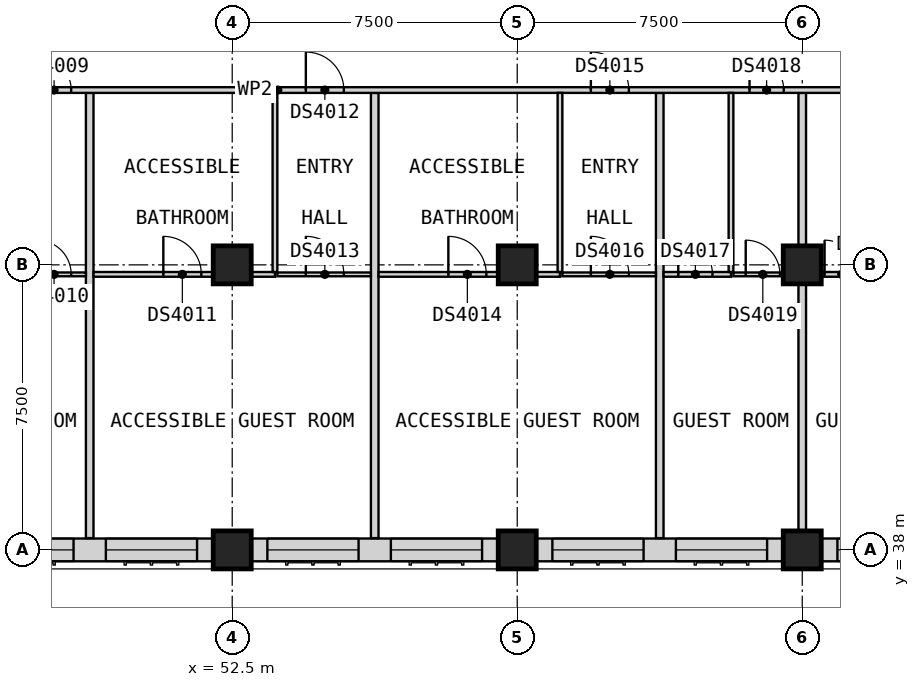
"""IFC4 building model, lengths in metres.
Left out: names, types, materials, properties, quantities, classifications, styles, units other than length and angle.
Written with IfcOpenShell. Run it as: python <this file> out.ifc"""

import sys

from ifc_helpers import new_model, si_unit, direction, frame, frame_2d, origin, origin_2d, place, context, subcontext, project, spatial, rectangle, extrude, element, fill, save


model = new_model("IFC4")
c1 = context("Model", 3, precision=1e-05, world=origin(), true_north=direction((0.0, 1.0)))
c2 = subcontext(c1, "Body", "Model", "MODEL_VIEW")
j1 = project(units=[si_unit("LENGTHUNIT", "METRE"), si_unit("PLANEANGLEUNIT", "RADIAN")], contexts=[c1])
p1 = place(None, origin())
s1 = spatial("IfcSite", under=j1, at=p1, CompositionType="ELEMENT")
p2 = place(p1, origin())
s2 = spatial("IfcBuilding", under=s1, at=p2, CompositionType="ELEMENT")
p3 = place(p2, frame((0.0, 0.0, 141.0)))
s3 = spatial("IfcBuildingStorey", under=s2, at=p3, CompositionType="ELEMENT", Elevation=141.0)
for number, where, z_axis, x_axis in (
    (1, (52.5, 38.0, 0.0), (0.0, 0.0, 1.0), (1.0, 0.0, 0.0)),
    (2, (52.5, 45.5, 0.0), (0.0, 0.0, 1.0), (1.0, 0.0, 0.0)),
    (3, (60.0, 38.0, 0.0), (0.0, 0.0, 1.0), (1.0, 0.0, 0.0)),
    (4, (60.0, 45.5, 0.0), (0.0, 0.0, 1.0), (1.0, 0.0, 0.0)),
    (5, (67.5, 38.0, 0.0), (0.0, 0.0, 1.0), (1.0, 0.0, 0.0)),
    (6, (67.5, 45.5, 0.0), (0.0, 0.0, 1.0), (1.0, 0.0, 0.0)),
):
    element("IfcColumn", number, at=place(p3, frame(where, z_axis=z_axis, x_axis=x_axis)), inside=s3, PredefinedType="COLUMN", context=c2, shape_type="SweptSolid", body=[
        extrude(rectangle(XDim=1.0, YDim=1.0, at=origin_2d()), origin(), (0.0, 0.0, 1.0), 3.6),
    ])
p4 = place(p3, frame((45.5, 38.0, 0.0), z_axis=(0.0, 0.0, 1.0), x_axis=(1.0, 0.0, 0.0)))
e7 = element("IfcWall", 7, at=p4, inside=s3, PredefinedType="SOLIDWALL", context=c2, shape_type="SweptSolid", body=[
    extrude(rectangle(XDim=6.5, YDim=0.6, at=frame_2d((3.25, 0.0))), origin(), (0.0, 0.0, 1.0), 2.85),
])
p5 = place(p4, frame((0.425, 0.0, 0.8)))
e8 = element("IfcOpeningElement", 8, at=p5, cuts=e7, PredefinedType="OPENING", context=c2, shape_type="SweptSolid", body=[
    extrude(rectangle(XDim=2.4, YDim=1.8, at=frame_2d((1.2, 0.9))), frame((0.0, 0.31, 0.0), z_axis=(0.0, -1.0, 0.0), x_axis=(1.0, 0.0, 0.0)), (0.0, 0.0, 1.0), 0.62),
])
p6 = place(p4, frame((3.675, 0.0, 0.8)))
e9 = element("IfcOpeningElement", 9, at=p6, cuts=e7, PredefinedType="OPENING", context=c2, shape_type="SweptSolid", body=[
    extrude(rectangle(XDim=2.4, YDim=1.8, at=frame_2d((1.2, 0.9))), frame((0.0, 0.31, 0.0), z_axis=(0.0, -1.0, 0.0), x_axis=(1.0, 0.0, 0.0)), (0.0, 0.0, 1.0), 0.62),
])
p7 = place(p3, frame((53.0, 38.0, 0.0), z_axis=(0.0, 0.0, 1.0), x_axis=(1.0, 0.0, 0.0)))
e10 = element("IfcWall", 10, at=p7, inside=s3, PredefinedType="SOLIDWALL", context=c2, shape_type="SweptSolid", body=[
    extrude(rectangle(XDim=6.5, YDim=0.6, at=frame_2d((3.25, 0.0))), origin(), (0.0, 0.0, 1.0), 2.85),
])
p8 = place(p7, frame((0.425, 0.0, 0.8)))
e11 = element("IfcOpeningElement", 11, at=p8, cuts=e10, PredefinedType="OPENING", context=c2, shape_type="SweptSolid", body=[
    extrude(rectangle(XDim=2.4, YDim=1.8, at=frame_2d((1.2, 0.9))), frame((0.0, 0.31, 0.0), z_axis=(0.0, -1.0, 0.0), x_axis=(1.0, 0.0, 0.0)), (0.0, 0.0, 1.0), 0.62),
])
p9 = place(p7, frame((3.675, 0.0, 0.8)))
e12 = element("IfcOpeningElement", 12, at=p9, cuts=e10, PredefinedType="OPENING", context=c2, shape_type="SweptSolid", body=[
    extrude(rectangle(XDim=2.4, YDim=1.8, at=frame_2d((1.2, 0.9))), frame((0.0, 0.31, 0.0), z_axis=(0.0, -1.0, 0.0), x_axis=(1.0, 0.0, 0.0)), (0.0, 0.0, 1.0), 0.62),
])
p10 = place(p3, frame((60.5, 38.0, 0.0), z_axis=(0.0, 0.0, 1.0), x_axis=(1.0, 0.0, 0.0)))
e13 = element("IfcWall", 13, at=p10, inside=s3, PredefinedType="SOLIDWALL", context=c2, shape_type="SweptSolid", body=[
    extrude(rectangle(XDim=6.5, YDim=0.6, at=frame_2d((3.25, 0.0))), origin(), (0.0, 0.0, 1.0), 2.85),
])
p11 = place(p10, frame((0.425, 0.0, 0.8)))
e14 = element("IfcOpeningElement", 14, at=p11, cuts=e13, PredefinedType="OPENING", context=c2, shape_type="SweptSolid", body=[
    extrude(rectangle(XDim=2.4, YDim=1.8, at=frame_2d((1.2, 0.9))), frame((0.0, 0.31, 0.0), z_axis=(0.0, -1.0, 0.0), x_axis=(1.0, 0.0, 0.0)), (0.0, 0.0, 1.0), 0.62),
])
p12 = place(p10, frame((3.675, 0.0, 0.8)))
e15 = element("IfcOpeningElement", 15, at=p12, cuts=e13, PredefinedType="OPENING", context=c2, shape_type="SweptSolid", body=[
    extrude(rectangle(XDim=2.4, YDim=1.8, at=frame_2d((1.2, 0.9))), frame((0.0, 0.31, 0.0), z_axis=(0.0, -1.0, 0.0), x_axis=(1.0, 0.0, 0.0)), (0.0, 0.0, 1.0), 0.62),
])
p13 = place(p3, frame((68.0, 38.0, 0.0), z_axis=(0.0, 0.0, 1.0), x_axis=(1.0, 0.0, 0.0)))
e16 = element("IfcWall", 16, at=p13, inside=s3, PredefinedType="SOLIDWALL", context=c2, shape_type="SweptSolid", body=[
    extrude(rectangle(XDim=6.0, YDim=0.6, at=frame_2d((3.0, 0.0))), origin(), (0.0, 0.0, 1.0), 2.85),
])
p14 = place(p13, frame((0.425, 0.0, 0.8)))
e17 = element("IfcOpeningElement", 17, at=p14, cuts=e16, PredefinedType="OPENING", context=c2, shape_type="SweptSolid", body=[
    extrude(rectangle(XDim=2.4, YDim=1.8, at=frame_2d((1.2, 0.9))), frame((0.0, 0.31, 0.0), z_axis=(0.0, -1.0, 0.0), x_axis=(1.0, 0.0, 0.0)), (0.0, 0.0, 1.0), 0.62),
])
p15 = place(p13, frame((3.425, 0.0, 0.8)))
e18 = element("IfcOpeningElement", 18, at=p15, cuts=e16, PredefinedType="OPENING", context=c2, shape_type="SweptSolid", body=[
    extrude(rectangle(XDim=2.4, YDim=1.8, at=frame_2d((1.2, 0.9))), frame((0.0, 0.31, 0.0), z_axis=(0.0, -1.0, 0.0), x_axis=(1.0, 0.0, 0.0)), (0.0, 0.0, 1.0), 0.62),
])
for number, where, z_axis, x_axis in (
    (19, (48.75, 38.31, 0.0), (0.0, 0.0, 1.0), (0.0, 1.0, 0.0)),
    (20, (56.25, 38.31, 0.0), (0.0, 0.0, 1.0), (0.0, 1.0, 0.0)),
    (21, (63.75, 38.31, 0.0), (0.0, 0.0, 1.0), (0.0, 1.0, 0.0)),
):
    element("IfcWall", number, at=place(p3, frame(where, z_axis=z_axis, x_axis=x_axis)), inside=s3, PredefinedType="PARTITIONING", context=c2, shape_type="SweptSolid", body=[
        extrude(rectangle(XDim=11.715, YDim=0.2, at=frame_2d((5.857, 0.0))), origin(), (0.0, 0.0, 1.0), 3.35),
    ])
p16 = place(p3, frame((67.5, 37.5, 0.0), z_axis=(0.0, 0.0, 1.0), x_axis=(0.0, 1.0, 0.0)))
e22 = element("IfcWall", 22, at=p16, inside=s3, PredefinedType="PARTITIONING", context=c2, shape_type="SweptSolid", body=[
    extrude(rectangle(XDim=12.525, YDim=0.2, at=frame_2d((6.262, 0.0))), origin(), (0.0, 0.0, 1.0), 3.35),
])
p17 = place(p3, frame((33.75, 50.1, 0.0), z_axis=(0.0, 0.0, 1.0), x_axis=(1.0, 0.0, 0.0)))
e23 = element("IfcWall", 23, at=p17, inside=s3, PredefinedType="PARTITIONING", context=c2, shape_type="SweptSolid", body=[
    extrude(rectangle(XDim=39.9, YDim=0.15, at=frame_2d((19.95, 0.0))), origin(), (0.0, 0.0, 1.0), 3.35),
])
p18 = place(p17, frame((5.175, 0.0, 0.0)))
e24 = element("IfcOpeningElement", 24, at=p18, cuts=e23, PredefinedType="OPENING", context=c2, shape_type="SweptSolid", body=[
    extrude(rectangle(XDim=0.9, YDim=2.1, at=frame_2d((0.45, 1.05))), frame((0.0, 0.085, 0.0), z_axis=(0.0, -1.0, 0.0), x_axis=(1.0, 0.0, 0.0)), (0.0, 0.0, 1.0), 0.17),
])
p19 = place(p17, frame((9.863, 0.0, 0.0)))
e25 = element("IfcOpeningElement", 25, at=p19, cuts=e23, PredefinedType="OPENING", context=c2, shape_type="SweptSolid", body=[
    extrude(rectangle(XDim=0.9, YDim=2.1, at=frame_2d((0.45, 1.05))), frame((0.0, 0.085, 0.0), z_axis=(0.0, -1.0, 0.0), x_axis=(1.0, 0.0, 0.0)), (0.0, 0.0, 1.0), 0.17),
])
p20 = place(p17, frame((13.613, 0.0, 0.0)))
e26 = element("IfcOpeningElement", 26, at=p20, cuts=e23, PredefinedType="OPENING", context=c2, shape_type="SweptSolid", body=[
    extrude(rectangle(XDim=0.9, YDim=2.1, at=frame_2d((0.45, 1.05))), frame((0.0, 0.085, 0.0), z_axis=(0.0, -1.0, 0.0), x_axis=(1.0, 0.0, 0.0)), (0.0, 0.0, 1.0), 0.17),
])
p21 = place(p17, frame((20.688, 0.0, 0.0)))
e27 = element("IfcOpeningElement", 27, at=p21, cuts=e23, PredefinedType="OPENING", context=c2, shape_type="SweptSolid", body=[
    extrude(rectangle(XDim=1.0, YDim=2.1, at=frame_2d((0.5, 1.05))), frame((0.0, 0.085, 0.0), z_axis=(0.0, -1.0, 0.0), x_axis=(1.0, 0.0, 0.0)), (0.0, 0.0, 1.0), 0.17),
])
p22 = place(p17, frame((28.188, 0.0, 0.0)))
e28 = element("IfcOpeningElement", 28, at=p22, cuts=e23, PredefinedType="OPENING", context=c2, shape_type="SweptSolid", body=[
    extrude(rectangle(XDim=1.0, YDim=2.1, at=frame_2d((0.5, 1.05))), frame((0.0, 0.085, 0.0), z_axis=(0.0, -1.0, 0.0), x_axis=(1.0, 0.0, 0.0)), (0.0, 0.0, 1.0), 0.17),
])
p23 = place(p17, frame((32.363, 0.0, 0.0)))
e29 = element("IfcOpeningElement", 29, at=p23, cuts=e23, PredefinedType="OPENING", context=c2, shape_type="SweptSolid", body=[
    extrude(rectangle(XDim=0.9, YDim=2.1, at=frame_2d((0.45, 1.05))), frame((0.0, 0.085, 0.0), z_axis=(0.0, -1.0, 0.0), x_axis=(1.0, 0.0, 0.0)), (0.0, 0.0, 1.0), 0.17),
])
p24 = place(p17, frame((36.113, 0.0, 0.0)))
e30 = element("IfcOpeningElement", 30, at=p24, cuts=e23, PredefinedType="OPENING", context=c2, shape_type="SweptSolid", body=[
    extrude(rectangle(XDim=0.9, YDim=2.1, at=frame_2d((0.45, 1.05))), frame((0.0, 0.085, 0.0), z_axis=(0.0, -1.0, 0.0), x_axis=(1.0, 0.0, 0.0)), (0.0, 0.0, 1.0), 0.17),
])
p25 = place(p17, frame((38.25, 0.0, 0.0)))
e31 = element("IfcOpeningElement", 31, at=p25, cuts=e23, PredefinedType="OPENING", context=c2, shape_type="SweptSolid", body=[
    extrude(rectangle(XDim=0.9, YDim=2.1, at=frame_2d((0.45, 1.05))), frame((0.0, 0.085, 0.0), z_axis=(0.0, -1.0, 0.0), x_axis=(1.0, 0.0, 0.0)), (0.0, 0.0, 1.0), 0.17),
])
p26 = place(p3, frame((46.938, 45.25, 0.0), z_axis=(0.0, 0.0, 1.0), x_axis=(1.0, 0.0, 0.0)))
e32 = element("IfcWall", 32, at=p26, inside=s3, PredefinedType="PARTITIONING", context=c2, shape_type="SweptSolid", body=[
    extrude(rectangle(XDim=1.712, YDim=0.1, at=frame_2d((0.856, 0.0))), origin(), (0.0, 0.0, 1.0), 3.35),
])
p27 = place(p26, frame((0.425, 0.0, 0.0)))
e33 = element("IfcOpeningElement", 33, at=p27, cuts=e32, PredefinedType="OPENING", context=c2, shape_type="SweptSolid", body=[
    extrude(rectangle(XDim=0.9, YDim=2.1, at=frame_2d((0.45, 1.05))), frame((0.0, 0.06, 0.0), z_axis=(0.0, -1.0, 0.0), x_axis=(1.0, 0.0, 0.0)), (0.0, 0.0, 1.0), 0.12),
])
p28 = place(p3, frame((53.688, 45.25, 0.0), z_axis=(0.0, 0.0, 1.0), x_axis=(1.0, 0.0, 0.0)))
e34 = element("IfcWall", 34, at=p28, inside=s3, PredefinedType="PARTITIONING", context=c2, shape_type="SweptSolid", body=[
    extrude(rectangle(XDim=2.462, YDim=0.1, at=frame_2d((1.231, 0.0))), origin(), (0.0, 0.0, 1.0), 3.35),
])
p29 = place(p28, frame((0.75, 0.0, 0.0)))
e35 = element("IfcOpeningElement", 35, at=p29, cuts=e34, PredefinedType="OPENING", context=c2, shape_type="SweptSolid", body=[
    extrude(rectangle(XDim=1.0, YDim=2.1, at=frame_2d((0.5, 1.05))), frame((0.0, 0.06, 0.0), z_axis=(0.0, -1.0, 0.0), x_axis=(1.0, 0.0, 0.0)), (0.0, 0.0, 1.0), 0.12),
])
p30 = place(p3, frame((61.188, 45.25, 0.0), z_axis=(0.0, 0.0, 1.0), x_axis=(1.0, 0.0, 0.0)))
e36 = element("IfcWall", 36, at=p30, inside=s3, PredefinedType="PARTITIONING", context=c2, shape_type="SweptSolid", body=[
    extrude(rectangle(XDim=2.462, YDim=0.1, at=frame_2d((1.231, 0.0))), origin(), (0.0, 0.0, 1.0), 3.35),
])
p31 = place(p30, frame((0.75, 0.0, 0.0)))
e37 = element("IfcOpeningElement", 37, at=p31, cuts=e36, PredefinedType="OPENING", context=c2, shape_type="SweptSolid", body=[
    extrude(rectangle(XDim=1.0, YDim=2.1, at=frame_2d((0.5, 1.05))), frame((0.0, 0.06, 0.0), z_axis=(0.0, -1.0, 0.0), x_axis=(1.0, 0.0, 0.0)), (0.0, 0.0, 1.0), 0.12),
])
p32 = place(p3, frame((65.688, 45.25, 0.0), z_axis=(0.0, 0.0, 1.0), x_axis=(1.0, 0.0, 0.0)))
e38 = element("IfcWall", 38, at=p32, inside=s3, PredefinedType="PARTITIONING", context=c2, shape_type="SweptSolid", body=[
    extrude(rectangle(XDim=1.712, YDim=0.1, at=frame_2d((0.856, 0.0))), origin(), (0.0, 0.0, 1.0), 3.35),
])
p33 = place(p32, frame((0.325, 0.0, 0.0)))
e39 = element("IfcOpeningElement", 39, at=p33, cuts=e38, PredefinedType="OPENING", context=c2, shape_type="SweptSolid", body=[
    extrude(rectangle(XDim=0.9, YDim=2.1, at=frame_2d((0.45, 1.05))), frame((0.0, 0.06, 0.0), z_axis=(0.0, -1.0, 0.0), x_axis=(1.0, 0.0, 0.0)), (0.0, 0.0, 1.0), 0.12),
])
p34 = place(p3, frame((48.85, 45.25, 0.0), z_axis=(0.0, 0.0, 1.0), x_axis=(1.0, 0.0, 0.0)))
e40 = element("IfcWall", 40, at=p34, inside=s3, PredefinedType="PARTITIONING", context=c2, shape_type="SweptSolid", body=[
    extrude(rectangle(XDim=4.775, YDim=0.125, at=frame_2d((2.387, 0.0))), origin(), (0.0, 0.0, 1.0), 3.35),
])
p35 = place(p34, frame((1.837, 0.0, 0.0)))
e41 = element("IfcOpeningElement", 41, at=p35, cuts=e40, PredefinedType="OPENING", context=c2, shape_type="SweptSolid", body=[
    extrude(rectangle(XDim=1.0, YDim=2.1, at=frame_2d((0.5, 1.05))), frame((0.0, 0.073, 0.0), z_axis=(0.0, -1.0, 0.0), x_axis=(1.0, 0.0, 0.0)), (0.0, 0.0, 1.0), 0.145),
])
p36 = place(p3, frame((56.35, 45.25, 0.0), z_axis=(0.0, 0.0, 1.0), x_axis=(1.0, 0.0, 0.0)))
e42 = element("IfcWall", 42, at=p36, inside=s3, PredefinedType="PARTITIONING", context=c2, shape_type="SweptSolid", body=[
    extrude(rectangle(XDim=4.775, YDim=0.125, at=frame_2d((2.387, 0.0))), origin(), (0.0, 0.0, 1.0), 3.35),
])
p37 = place(p36, frame((1.837, 0.0, 0.0)))
e43 = element("IfcOpeningElement", 43, at=p37, cuts=e42, PredefinedType="OPENING", context=c2, shape_type="SweptSolid", body=[
    extrude(rectangle(XDim=1.0, YDim=2.1, at=frame_2d((0.5, 1.05))), frame((0.0, 0.073, 0.0), z_axis=(0.0, -1.0, 0.0), x_axis=(1.0, 0.0, 0.0)), (0.0, 0.0, 1.0), 0.145),
])
p38 = place(p3, frame((63.85, 45.25, 0.0), z_axis=(0.0, 0.0, 1.0), x_axis=(1.0, 0.0, 0.0)))
e44 = element("IfcWall", 44, at=p38, inside=s3, PredefinedType="PARTITIONING", context=c2, shape_type="SweptSolid", body=[
    extrude(rectangle(XDim=1.775, YDim=0.125, at=frame_2d((0.887, 0.0))), origin(), (0.0, 0.0, 1.0), 3.35),
])
p39 = place(p38, frame((0.387, 0.0, 0.0)))
e45 = element("IfcOpeningElement", 45, at=p39, cuts=e44, PredefinedType="OPENING", context=c2, shape_type="SweptSolid", body=[
    extrude(rectangle(XDim=0.9, YDim=2.1, at=frame_2d((0.45, 1.05))), frame((0.0, 0.073, 0.0), z_axis=(0.0, -1.0, 0.0), x_axis=(1.0, 0.0, 0.0)), (0.0, 0.0, 1.0), 0.145),
])
p40 = place(p3, frame((67.6, 45.25, 0.0), z_axis=(0.0, 0.0, 1.0), x_axis=(1.0, 0.0, 0.0)))
e46 = element("IfcWall", 46, at=p40, inside=s3, PredefinedType="PARTITIONING", context=c2, shape_type="SweptSolid", body=[
    extrude(rectangle(XDim=1.775, YDim=0.125, at=frame_2d((0.887, 0.0))), origin(), (0.0, 0.0, 1.0), 3.35),
])
p41 = place(p40, frame((0.488, 0.0, 0.0)))
e47 = element("IfcOpeningElement", 47, at=p41, cuts=e46, PredefinedType="OPENING", context=c2, shape_type="SweptSolid", body=[
    extrude(rectangle(XDim=0.9, YDim=2.1, at=frame_2d((0.45, 1.05))), frame((0.0, 0.073, 0.0), z_axis=(0.0, -1.0, 0.0), x_axis=(1.0, 0.0, 0.0)), (0.0, 0.0, 1.0), 0.145),
])
for number, where, z_axis, x_axis in (
    (48, (53.625, 45.312, 0.0), (0.0, 0.0, 1.0), (0.0, 1.0, 0.0)),
    (49, (61.125, 45.312, 0.0), (0.0, 0.0, 1.0), (0.0, 1.0, 0.0)),
    (50, (65.625, 45.312, 0.0), (0.0, 0.0, 1.0), (0.0, 1.0, 0.0)),
):
    element("IfcWall", number, at=place(p3, frame(where, z_axis=z_axis, x_axis=x_axis)), inside=s3, PredefinedType="PARTITIONING", context=c2, shape_type="SweptSolid", body=[
        extrude(rectangle(XDim=4.712, YDim=0.125, at=frame_2d((2.356, 0.0))), origin(), (0.0, 0.0, 1.0), 3.35),
    ])
p42 = place(p5, origin())
e51 = element("IfcWindow", 51, at=p42, inside=s3, PartitioningType="SINGLE_PANEL", PredefinedType="WINDOW", context=c2, shape_type="SweptSolid", body=[
    extrude(rectangle(XDim=2.4, YDim=1.8, at=frame_2d((1.2, 0.9))), frame((0.0, -0.07, 0.0), z_axis=(0.0, -1.0, 0.0), x_axis=(1.0, 0.0, 0.0)), (0.0, 0.0, 1.0), 0.06),
])
fill(e8, e51)
p43 = place(p6, origin())
e52 = element("IfcWindow", 52, at=p43, inside=s3, PartitioningType="SINGLE_PANEL", PredefinedType="WINDOW", context=c2, shape_type="SweptSolid", body=[
    extrude(rectangle(XDim=2.4, YDim=1.8, at=frame_2d((1.2, 0.9))), frame((0.0, -0.07, 0.0), z_axis=(0.0, -1.0, 0.0), x_axis=(1.0, 0.0, 0.0)), (0.0, 0.0, 1.0), 0.06),
])
fill(e9, e52)
p44 = place(p8, origin())
e53 = element("IfcWindow", 53, at=p44, inside=s3, PartitioningType="SINGLE_PANEL", PredefinedType="WINDOW", context=c2, shape_type="SweptSolid", body=[
    extrude(rectangle(XDim=2.4, YDim=1.8, at=frame_2d((1.2, 0.9))), frame((0.0, -0.07, 0.0), z_axis=(0.0, -1.0, 0.0), x_axis=(1.0, 0.0, 0.0)), (0.0, 0.0, 1.0), 0.06),
])
fill(e11, e53)
p45 = place(p9, origin())
e54 = element("IfcWindow", 54, at=p45, inside=s3, PartitioningType="SINGLE_PANEL", PredefinedType="WINDOW", context=c2, shape_type="SweptSolid", body=[
    extrude(rectangle(XDim=2.4, YDim=1.8, at=frame_2d((1.2, 0.9))), frame((0.0, -0.07, 0.0), z_axis=(0.0, -1.0, 0.0), x_axis=(1.0, 0.0, 0.0)), (0.0, 0.0, 1.0), 0.06),
])
fill(e12, e54)
p46 = place(p11, origin())
e55 = element("IfcWindow", 55, at=p46, inside=s3, PartitioningType="SINGLE_PANEL", PredefinedType="WINDOW", context=c2, shape_type="SweptSolid", body=[
    extrude(rectangle(XDim=2.4, YDim=1.8, at=frame_2d((1.2, 0.9))), frame((0.0, -0.07, 0.0), z_axis=(0.0, -1.0, 0.0), x_axis=(1.0, 0.0, 0.0)), (0.0, 0.0, 1.0), 0.06),
])
fill(e14, e55)
p47 = place(p12, origin())
e56 = element("IfcWindow", 56, at=p47, inside=s3, PartitioningType="SINGLE_PANEL", PredefinedType="WINDOW", context=c2, shape_type="SweptSolid", body=[
    extrude(rectangle(XDim=2.4, YDim=1.8, at=frame_2d((1.2, 0.9))), frame((0.0, -0.07, 0.0), z_axis=(0.0, -1.0, 0.0), x_axis=(1.0, 0.0, 0.0)), (0.0, 0.0, 1.0), 0.06),
])
fill(e15, e56)
p48 = place(p14, origin())
e57 = element("IfcWindow", 57, at=p48, inside=s3, PartitioningType="SINGLE_PANEL", PredefinedType="WINDOW", context=c2, shape_type="SweptSolid", body=[
    extrude(rectangle(XDim=2.4, YDim=1.8, at=frame_2d((1.2, 0.9))), frame((0.0, -0.07, 0.0), z_axis=(0.0, -1.0, 0.0), x_axis=(1.0, 0.0, 0.0)), (0.0, 0.0, 1.0), 0.06),
])
fill(e17, e57)
p49 = place(p20, origin())
e58 = element("IfcDoor", 58, at=p49, inside=s3, OperationType="SINGLE_SWING_RIGHT", PredefinedType="DOOR", context=c2, shape_type="SweptSolid", body=[
    extrude(rectangle(XDim=0.9, YDim=2.1, at=frame_2d((0.45, 1.05))), frame((0.0, 0.025, 0.0), z_axis=(0.0, -1.0, 0.0), x_axis=(1.0, 0.0, 0.0)), (0.0, 0.0, 1.0), 0.05),
])
fill(e26, e58)
p50 = place(p27, origin())
e59 = element("IfcDoor", 59, at=p50, inside=s3, OperationType="SINGLE_SWING_LEFT", PredefinedType="DOOR", context=c2, shape_type="SweptSolid", body=[
    extrude(rectangle(XDim=0.9, YDim=2.1, at=frame_2d((0.45, 1.05))), frame((0.0, 0.025, 0.0), z_axis=(0.0, -1.0, 0.0), x_axis=(1.0, 0.0, 0.0)), (0.0, 0.0, 1.0), 0.05),
])
fill(e33, e59)
p51 = place(p35, origin())
e60 = element("IfcDoor", 60, at=p51, inside=s3, OperationType="SINGLE_SWING_LEFT", PredefinedType="DOOR", context=c2, shape_type="SweptSolid", body=[
    extrude(rectangle(XDim=1.0, YDim=2.1, at=frame_2d((0.5, 1.05))), frame((0.0, 0.025, 0.0), z_axis=(0.0, -1.0, 0.0), x_axis=(1.0, 0.0, 0.0)), (0.0, 0.0, 1.0), 0.05),
])
fill(e41, e60)
p52 = place(p21, origin())
e61 = element("IfcDoor", 61, at=p52, inside=s3, OperationType="SINGLE_SWING_RIGHT", PredefinedType="DOOR", context=c2, shape_type="SweptSolid", body=[
    extrude(rectangle(XDim=1.0, YDim=2.1, at=frame_2d((0.5, 1.05))), frame((0.0, 0.025, 0.0), z_axis=(0.0, -1.0, 0.0), x_axis=(1.0, 0.0, 0.0)), (0.0, 0.0, 1.0), 0.05),
])
fill(e27, e61)
p53 = place(p29, origin())
e62 = element("IfcDoor", 62, at=p53, inside=s3, OperationType="SINGLE_SWING_LEFT", PredefinedType="DOOR", context=c2, shape_type="SweptSolid", body=[
    extrude(rectangle(XDim=1.0, YDim=2.1, at=frame_2d((0.5, 1.05))), frame((0.0, 0.025, 0.0), z_axis=(0.0, -1.0, 0.0), x_axis=(1.0, 0.0, 0.0)), (0.0, 0.0, 1.0), 0.05),
])
fill(e35, e62)
p54 = place(p37, origin())
e63 = element("IfcDoor", 63, at=p54, inside=s3, OperationType="SINGLE_SWING_LEFT", PredefinedType="DOOR", context=c2, shape_type="SweptSolid", body=[
    extrude(rectangle(XDim=1.0, YDim=2.1, at=frame_2d((0.5, 1.05))), frame((0.0, 0.025, 0.0), z_axis=(0.0, -1.0, 0.0), x_axis=(1.0, 0.0, 0.0)), (0.0, 0.0, 1.0), 0.05),
])
fill(e43, e63)
p55 = place(p22, origin())
e64 = element("IfcDoor", 64, at=p55, inside=s3, OperationType="SINGLE_SWING_RIGHT", PredefinedType="DOOR", context=c2, shape_type="SweptSolid", body=[
    extrude(rectangle(XDim=1.0, YDim=2.1, at=frame_2d((0.5, 1.05))), frame((0.0, 0.025, 0.0), z_axis=(0.0, -1.0, 0.0), x_axis=(1.0, 0.0, 0.0)), (0.0, 0.0, 1.0), 0.05),
])
fill(e28, e64)
p56 = place(p31, origin())
e65 = element("IfcDoor", 65, at=p56, inside=s3, OperationType="SINGLE_SWING_LEFT", PredefinedType="DOOR", context=c2, shape_type="SweptSolid", body=[
    extrude(rectangle(XDim=1.0, YDim=2.1, at=frame_2d((0.5, 1.05))), frame((0.0, 0.025, 0.0), z_axis=(0.0, -1.0, 0.0), x_axis=(1.0, 0.0, 0.0)), (0.0, 0.0, 1.0), 0.05),
])
fill(e37, e65)
p57 = place(p39, origin())
e66 = element("IfcDoor", 66, at=p57, inside=s3, OperationType="SINGLE_SWING_LEFT", PredefinedType="DOOR", context=c2, shape_type="SweptSolid", body=[
    extrude(rectangle(XDim=0.9, YDim=2.1, at=frame_2d((0.45, 1.05))), frame((0.0, 0.025, 0.0), z_axis=(0.0, -1.0, 0.0), x_axis=(1.0, 0.0, 0.0)), (0.0, 0.0, 1.0), 0.05),
])
fill(e45, e66)
p58 = place(p23, origin())
e67 = element("IfcDoor", 67, at=p58, inside=s3, OperationType="SINGLE_SWING_RIGHT", PredefinedType="DOOR", context=c2, shape_type="SweptSolid", body=[
    extrude(rectangle(XDim=0.9, YDim=2.1, at=frame_2d((0.45, 1.05))), frame((0.0, 0.025, 0.0), z_axis=(0.0, -1.0, 0.0), x_axis=(1.0, 0.0, 0.0)), (0.0, 0.0, 1.0), 0.05),
])
fill(e29, e67)
p59 = place(p33, origin())
e68 = element("IfcDoor", 68, at=p59, inside=s3, OperationType="SINGLE_SWING_LEFT", PredefinedType="DOOR", context=c2, shape_type="SweptSolid", body=[
    extrude(rectangle(XDim=0.9, YDim=2.1, at=frame_2d((0.45, 1.05))), frame((0.0, 0.025, 0.0), z_axis=(0.0, -1.0, 0.0), x_axis=(1.0, 0.0, 0.0)), (0.0, 0.0, 1.0), 0.05),
])
fill(e39, e68)
p60 = place(p41, origin())
e69 = element("IfcDoor", 69, at=p60, inside=s3, OperationType="SINGLE_SWING_RIGHT", PredefinedType="DOOR", context=c2, shape_type="SweptSolid", body=[
    extrude(rectangle(XDim=0.9, YDim=2.1, at=frame_2d((0.45, 1.05))), frame((0.0, 0.025, 0.0), z_axis=(0.0, -1.0, 0.0), x_axis=(1.0, 0.0, 0.0)), (0.0, 0.0, 1.0), 0.05),
])
fill(e47, e69)
save(model, sys.argv[1])
